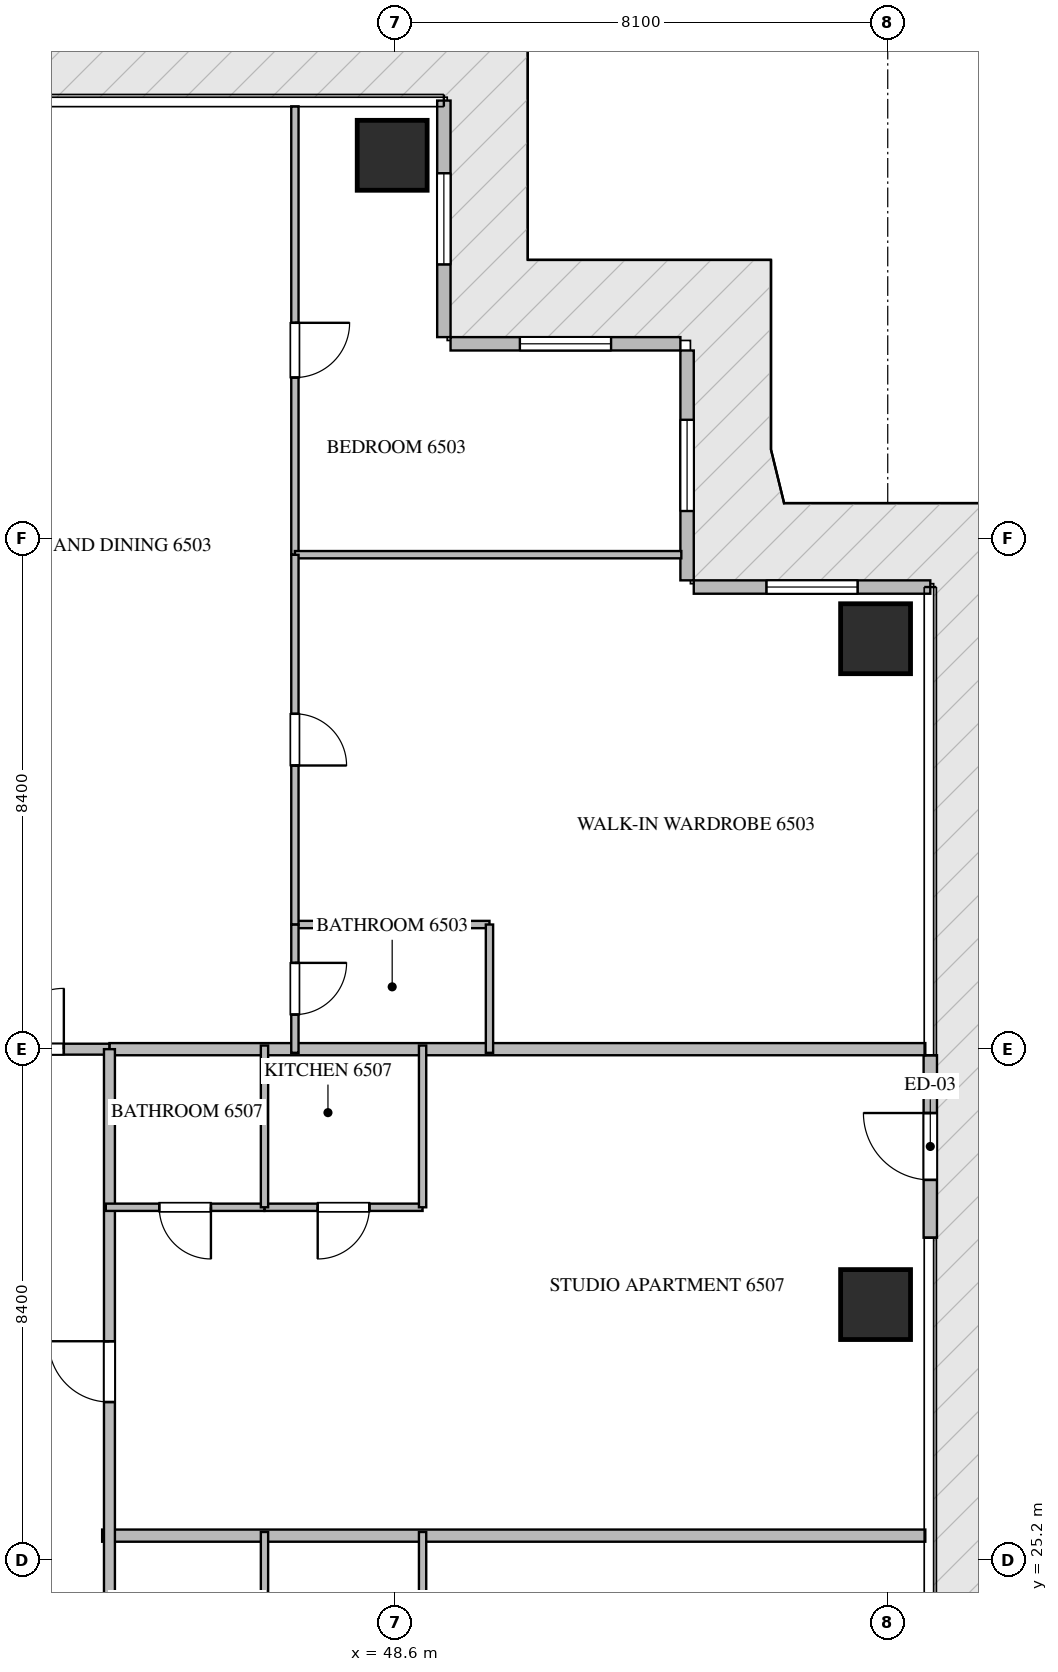
"""IFC4 building model, lengths in metres.
Left out: names, types, materials, properties, quantities, classifications, styles, units other than length and angle.
Written with IfcOpenShell. Run it as: python <this file> out.ifc"""

import sys

from ifc_helpers import new_model, si_unit, direction, frame, frame_2d, origin, origin_2d, place, context, subcontext, project, spatial, rectangle, extrude, source, transform, mapped, element, fill, save


model = new_model("IFC4")
c1 = context("Model", 3, precision=1e-05, world=origin(), true_north=direction((0.0, 1.0)))
c2 = subcontext(c1, "Body", "Model", "MODEL_VIEW")
j1 = project(units=[si_unit("LENGTHUNIT", "METRE"), si_unit("PLANEANGLEUNIT", "RADIAN")], contexts=[c1])
p1 = place(None, origin())
s1 = spatial("IfcSite", under=j1, at=p1, CompositionType="ELEMENT")
p2 = place(p1, origin())
s2 = spatial("IfcBuilding", under=s1, at=p2, CompositionType="ELEMENT")
p3 = place(p2, frame((0.0, 0.0, 260.5)))
s3 = spatial("IfcBuildingStorey", under=s2, at=p3, CompositionType="ELEMENT", Elevation=260.5)
m1 = source(origin(), c2, "Body", "SweptSolid", [
    extrude(rectangle(XDim=1.15, YDim=1.15, at=origin_2d()), origin(), (0.0, 0.0, 1.0), 3.85),
])
for number, where, z_axis, x_axis in (
    (1, (48.55, 48.3, -0.26), (0.0, 0.0, 1.0), (1.0, 0.0, 0.0)),
    (2, (56.5, 29.4, -0.26), (0.0, 0.0, 1.0), (1.0, 0.0, 0.0)),
    (3, (56.5, 40.35, -0.26), (0.0, 0.0, 1.0), (1.0, 0.0, 0.0)),
):
    element("IfcColumn", number, at=place(p3, frame(where, z_axis=z_axis, x_axis=x_axis)), inside=s3, PredefinedType="COLUMN", context=c2, shape_type="MappedRepresentation", body=[
        mapped(m1, transform((0.0, 0.0, 0.0), scale=1.0)),
    ])
p4 = place(p3, frame((57.4, 30.5, 0.0), z_axis=(0.0, 0.0, 1.0), x_axis=(0.0, 1.0, 0.0)))
e4 = element("IfcWall", 4, at=p4, inside=s3, PredefinedType="ELEMENTEDWALL", context=c2, shape_type="SweptSolid", body=[
    extrude(rectangle(XDim=3.0, YDim=0.22, at=frame_2d((1.5, 0.0))), origin(), (0.0, 0.0, 1.0), 3.575),
])
p5 = place(p4, frame((0.95, 0.0, 0.0)))
e5 = element("IfcOpeningElement", 5, at=p5, cuts=e4, PredefinedType="OPENING", context=c2, shape_type="SweptSolid", body=[
    extrude(rectangle(XDim=1.1, YDim=2.2, at=frame_2d((0.55, 1.1))), frame((0.0, 0.12, 0.0), z_axis=(0.0, -1.0, 0.0), x_axis=(1.0, 0.0, 0.0)), (0.0, 0.0, 1.0), 0.24),
])
p6 = place(p3, frame((57.4, 41.2, 0.0), z_axis=(0.0, 0.0, 1.0), x_axis=(-1.0, 0.0, 0.0)))
e6 = element("IfcWall", 6, at=p6, inside=s3, PredefinedType="ELEMENTEDWALL", context=c2, shape_type="SweptSolid", body=[
    extrude(rectangle(XDim=3.89, YDim=0.22, at=frame_2d((1.945, 0.0))), origin(), (0.0, 0.0, 1.0), 3.575),
])
p7 = place(p6, frame((1.195, 0.0, 0.65)))
e7 = element("IfcOpeningElement", 7, at=p7, cuts=e6, PredefinedType="OPENING", context=c2, shape_type="SweptSolid", body=[
    extrude(rectangle(XDim=1.5, YDim=2.25, at=frame_2d((0.75, 1.125))), frame((0.0, 0.12, 0.0), z_axis=(0.0, -1.0, 0.0), x_axis=(1.0, 0.0, 0.0)), (0.0, 0.0, 1.0), 0.24),
])
p8 = place(p3, frame((53.4, 41.31, 0.0), z_axis=(0.0, 0.0, 1.0), x_axis=(0.0, 1.0, 0.0)))
e8 = element("IfcWall", 8, at=p8, inside=s3, PredefinedType="ELEMENTEDWALL", context=c2, shape_type="SweptSolid", body=[
    extrude(rectangle(XDim=3.78, YDim=0.22, at=frame_2d((1.89, 0.0))), origin(), (0.0, 0.0, 1.0), 3.575),
])
p9 = place(p8, frame((1.14, 0.0, 0.65)))
e9 = element("IfcOpeningElement", 9, at=p9, cuts=e8, PredefinedType="OPENING", context=c2, shape_type="SweptSolid", body=[
    extrude(rectangle(XDim=1.5, YDim=2.25, at=frame_2d((0.75, 1.125))), frame((0.0, 0.12, 0.0), z_axis=(0.0, -1.0, 0.0), x_axis=(1.0, 0.0, 0.0)), (0.0, 0.0, 1.0), 0.24),
])
p10 = place(p3, frame((53.29, 45.2, 0.0), z_axis=(0.0, 0.0, 1.0), x_axis=(-1.0, 0.0, 0.0)))
e10 = element("IfcWall", 10, at=p10, inside=s3, PredefinedType="ELEMENTEDWALL", context=c2, shape_type="SweptSolid", body=[
    extrude(rectangle(XDim=3.78, YDim=0.22, at=frame_2d((1.89, 0.0))), origin(), (0.0, 0.0, 1.0), 3.575),
])
p11 = place(p10, frame((1.14, 0.0, 0.65)))
e11 = element("IfcOpeningElement", 11, at=p11, cuts=e10, PredefinedType="OPENING", context=c2, shape_type="SweptSolid", body=[
    extrude(rectangle(XDim=1.5, YDim=2.25, at=frame_2d((0.75, 1.125))), frame((0.0, 0.12, 0.0), z_axis=(0.0, -1.0, 0.0), x_axis=(1.0, 0.0, 0.0)), (0.0, 0.0, 1.0), 0.24),
])
p12 = place(p3, frame((49.4, 45.31, 0.0), z_axis=(0.0, 0.0, 1.0), x_axis=(0.0, 1.0, 0.0)))
e12 = element("IfcWall", 12, at=p12, inside=s3, PredefinedType="ELEMENTEDWALL", context=c2, shape_type="SweptSolid", body=[
    extrude(rectangle(XDim=3.89, YDim=0.22, at=frame_2d((1.945, 0.0))), origin(), (0.0, 0.0, 1.0), 3.575),
])
p13 = place(p12, frame((1.195, 0.0, 0.65)))
e13 = element("IfcOpeningElement", 13, at=p13, cuts=e12, PredefinedType="OPENING", context=c2, shape_type="SweptSolid", body=[
    extrude(rectangle(XDim=1.5, YDim=2.25, at=frame_2d((0.75, 1.125))), frame((0.0, 0.12, 0.0), z_axis=(0.0, -1.0, 0.0), x_axis=(1.0, 0.0, 0.0)), (0.0, 0.0, 1.0), 0.24),
])
p14 = place(p3, frame((43.78, 25.6, 0.0), z_axis=(0.0, 0.0, 1.0), x_axis=(1.0, 0.0, 0.0)))
e14 = element("IfcWall", 14, at=p14, inside=s3, PredefinedType="PARTITIONING", context=c2, shape_type="SweptSolid", body=[
    extrude(rectangle(XDim=13.538, YDim=0.2, at=frame_2d((6.769, 0.0))), origin(), (0.0, 0.0, 1.0), 3.59),
])
p15 = place(p3, frame((43.9, 33.6, 0.0), z_axis=(0.0, 0.0, 1.0), x_axis=(1.0, 0.0, 0.0)))
e15 = element("IfcWall", 15, at=p15, inside=s3, PredefinedType="PARTITIONING", context=c2, shape_type="SweptSolid", body=[
    extrude(rectangle(XDim=13.418, YDim=0.2, at=frame_2d((6.709, 0.0))), origin(), (0.0, 0.0, 1.0), 3.59),
])
p16 = place(p3, frame((41.402, 33.6, 0.0), z_axis=(0.0, 0.0, 1.0), x_axis=(1.0, 0.0, 0.0)))
e16 = element("IfcWall", 16, at=p16, inside=s3, PredefinedType="PARTITIONING", context=c2, shape_type="SweptSolid", body=[
    extrude(rectangle(XDim=2.496, YDim=0.18, at=frame_2d((1.248, 0.0))), origin(), (0.0, 0.0, 1.0), 3.59),
])
p17 = place(p16, frame((0.748, 0.0, 0.0)))
e17 = element("IfcOpeningElement", 17, at=p17, cuts=e16, PredefinedType="OPENING", context=c2, shape_type="SweptSolid", body=[
    extrude(rectangle(XDim=1.0, YDim=2.15, at=frame_2d((0.5, 1.075))), frame((0.0, 0.1, 0.0), z_axis=(0.0, -1.0, 0.0), x_axis=(1.0, 0.0, 0.0)), (0.0, 0.0, 1.0), 0.2),
])
p18 = place(p3, frame((43.9, 16.8, 0.0), z_axis=(0.0, 0.0, 1.0), x_axis=(0.0, 1.0, 0.0)))
e18 = element("IfcWall", 18, at=p18, inside=s3, PredefinedType="PARTITIONING", context=c2, shape_type="SweptSolid", body=[
    extrude(rectangle(XDim=16.8, YDim=0.18, at=frame_2d((8.4, 0.0))), origin(), (0.0, 0.0, 1.0), 3.59),
])
p19 = place(p18, frame((2.575, 0.0, 0.0)))
e19 = element("IfcOpeningElement", 19, at=p19, cuts=e18, PredefinedType="OPENING", context=c2, shape_type="SweptSolid", body=[
    extrude(rectangle(XDim=1.0, YDim=2.15, at=frame_2d((0.5, 1.075))), frame((0.0, 0.1, 0.0), z_axis=(0.0, -1.0, 0.0), x_axis=(1.0, 0.0, 0.0)), (0.0, 0.0, 1.0), 0.2),
])
p20 = place(p18, frame((10.997, 0.0, 0.0)))
e20 = element("IfcOpeningElement", 20, at=p20, cuts=e18, PredefinedType="OPENING", context=c2, shape_type="SweptSolid", body=[
    extrude(rectangle(XDim=1.0, YDim=2.15, at=frame_2d((0.5, 1.075))), frame((0.0, 0.1, 0.0), z_axis=(0.0, -1.0, 0.0), x_axis=(1.0, 0.0, 0.0)), (0.0, 0.0, 1.0), 0.2),
])
p21 = place(p3, frame((46.95, 49.105, 0.0), z_axis=(0.0, 0.0, 1.0), x_axis=(0.0, -1.0, 0.0)))
e21 = element("IfcWall", 21, at=p21, inside=s3, PredefinedType="PARTITIONING", context=c2, shape_type="SweptSolid", body=[
    extrude(rectangle(XDim=7.373, YDim=0.12, at=frame_2d((3.687, 0.0))), origin(), (0.0, 0.0, 1.0), 3.59),
])
p22 = place(p21, frame((3.56, 0.0, 0.0)))
e22 = element("IfcOpeningElement", 22, at=p22, cuts=e21, PredefinedType="OPENING", context=c2, shape_type="SweptSolid", body=[
    extrude(rectangle(XDim=0.9, YDim=2.1, at=frame_2d((0.45, 1.05))), frame((0.0, 0.07, 0.0), z_axis=(0.0, -1.0, 0.0), x_axis=(1.0, 0.0, 0.0)), (0.0, 0.0, 1.0), 0.14),
])
p23 = place(p3, frame((46.95, 41.732, 0.0), z_axis=(0.0, 0.0, 1.0), x_axis=(1.0, 0.0, 0.0)))
e23 = element("IfcWall", 23, at=p23, inside=s3, PredefinedType="PARTITIONING", context=c2, shape_type="SweptSolid", body=[
    extrude(rectangle(XDim=6.355, YDim=0.12, at=frame_2d((3.177, 0.0))), origin(), (0.0, 0.0, 1.0), 3.59),
])
p24 = place(p3, frame((46.95, 35.65, 0.0), z_axis=(0.0, 0.0, 1.0), x_axis=(1.0, 0.0, 0.0)))
e24 = element("IfcWall", 24, at=p24, inside=s3, PredefinedType="PARTITIONING", context=c2, shape_type="SweptSolid", body=[
    extrude(rectangle(XDim=3.2, YDim=0.12, at=frame_2d((1.6, 0.0))), origin(), (0.0, 0.0, 1.0), 3.59),
])
p25 = place(p3, frame((50.15, 35.65, 0.0), z_axis=(0.0, 0.0, 1.0), x_axis=(0.0, -1.0, 0.0)))
e25 = element("IfcWall", 25, at=p25, inside=s3, PredefinedType="PARTITIONING", context=c2, shape_type="SweptSolid", body=[
    extrude(rectangle(XDim=2.11, YDim=0.12, at=frame_2d((1.055, 0.0))), origin(), (0.0, 0.0, 1.0), 3.59),
])
p26 = place(p3, frame((46.95, 41.73, 0.0), z_axis=(0.0, 0.0, 1.0), x_axis=(0.0, -1.0, 0.0)))
e26 = element("IfcWall", 26, at=p26, inside=s3, PredefinedType="PARTITIONING", context=c2, shape_type="SweptSolid", body=[
    extrude(rectangle(XDim=6.08, YDim=0.12, at=frame_2d((3.04, 0.0))), origin(), (0.0, 0.0, 1.0), 3.59),
])
p27 = place(p26, frame((2.615, 0.0, 0.0)))
e27 = element("IfcOpeningElement", 27, at=p27, cuts=e26, PredefinedType="OPENING", context=c2, shape_type="SweptSolid", body=[
    extrude(rectangle(XDim=0.85, YDim=2.1, at=frame_2d((0.425, 1.05))), frame((0.0, 0.07, 0.0), z_axis=(0.0, -1.0, 0.0), x_axis=(1.0, 0.0, 0.0)), (0.0, 0.0, 1.0), 0.14),
])
p28 = place(p3, frame((46.95, 35.648, 0.0), z_axis=(0.0, 0.0, 1.0), x_axis=(0.0, -1.0, 0.0)))
e28 = element("IfcWall", 28, at=p28, inside=s3, PredefinedType="PARTITIONING", context=c2, shape_type="SweptSolid", body=[
    extrude(rectangle(XDim=2.108, YDim=0.12, at=frame_2d((1.054, 0.0))), origin(), (0.0, 0.0, 1.0), 3.59),
])
p29 = place(p28, frame((0.629, 0.0, 0.0)))
e29 = element("IfcOpeningElement", 29, at=p29, cuts=e28, PredefinedType="OPENING", context=c2, shape_type="SweptSolid", body=[
    extrude(rectangle(XDim=0.85, YDim=2.1, at=frame_2d((0.425, 1.05))), frame((0.0, 0.07, 0.0), z_axis=(0.0, -1.0, 0.0), x_axis=(1.0, 0.0, 0.0)), (0.0, 0.0, 1.0), 0.14),
])
for number, where, z_axis, x_axis in (
    (30, (46.45, 22.85, 0.0), (0.0, 0.0, 1.0), (0.0, 1.0, 0.0)),
    (31, (49.05, 22.85, 0.0), (0.0, 0.0, 1.0), (0.0, 1.0, 0.0)),
):
    element("IfcWall", number, at=place(p3, frame(where, z_axis=z_axis, x_axis=x_axis)), inside=s3, PredefinedType="PARTITIONING", context=c2, shape_type="SweptSolid", body=[
        extrude(rectangle(XDim=2.81, YDim=0.12, at=frame_2d((1.405, 0.0))), origin(), (0.0, 0.0, 1.0), 3.59),
    ])
p30 = place(p3, frame((49.05, 31.0, 0.0), z_axis=(0.0, 0.0, 1.0), x_axis=(-1.0, 0.0, 0.0)))
e32 = element("IfcWall", 32, at=p30, inside=s3, PredefinedType="PARTITIONING", context=c2, shape_type="SweptSolid", body=[
    extrude(rectangle(XDim=2.6, YDim=0.12, at=frame_2d((1.3, 0.0))), origin(), (0.0, 0.0, 1.0), 3.59),
])
p31 = place(p30, frame((0.875, 0.0, 0.0)))
e33 = element("IfcOpeningElement", 33, at=p31, cuts=e32, PredefinedType="OPENING", context=c2, shape_type="SweptSolid", body=[
    extrude(rectangle(XDim=0.85, YDim=2.1, at=frame_2d((0.425, 1.05))), frame((0.0, 0.07, 0.0), z_axis=(0.0, -1.0, 0.0), x_axis=(1.0, 0.0, 0.0)), (0.0, 0.0, 1.0), 0.14),
])
p32 = place(p3, frame((46.448, 31.0, 0.0), z_axis=(0.0, 0.0, 1.0), x_axis=(-1.0, 0.0, 0.0)))
e34 = element("IfcWall", 34, at=p32, inside=s3, PredefinedType="PARTITIONING", context=c2, shape_type="SweptSolid", body=[
    extrude(rectangle(XDim=2.608, YDim=0.12, at=frame_2d((1.304, 0.0))), origin(), (0.0, 0.0, 1.0), 3.59),
])
p33 = place(p32, frame((0.879, 0.0, 0.0)))
e35 = element("IfcOpeningElement", 35, at=p33, cuts=e34, PredefinedType="OPENING", context=c2, shape_type="SweptSolid", body=[
    extrude(rectangle(XDim=0.85, YDim=2.1, at=frame_2d((0.425, 1.05))), frame((0.0, 0.07, 0.0), z_axis=(0.0, -1.0, 0.0), x_axis=(1.0, 0.0, 0.0)), (0.0, 0.0, 1.0), 0.14),
])
for number, where, z_axis, x_axis in (
    (36, (46.45, 31.0, 0.0), (0.0, 0.0, 1.0), (0.0, 1.0, 0.0)),
    (37, (49.05, 31.0, 0.0), (0.0, 0.0, 1.0), (0.0, 1.0, 0.0)),
):
    element("IfcWall", number, at=place(p3, frame(where, z_axis=z_axis, x_axis=x_axis)), inside=s3, PredefinedType="PARTITIONING", context=c2, shape_type="SweptSolid", body=[
        extrude(rectangle(XDim=2.66, YDim=0.12, at=frame_2d((1.33, 0.0))), origin(), (0.0, 0.0, 1.0), 3.59),
    ])
m2 = source(origin(), c2, "Body", "SweptSolid", [
    extrude(rectangle(XDim=1.1, YDim=2.2, at=frame_2d((0.55, 1.1))), frame((0.0, 0.025, 0.0), z_axis=(0.0, -1.0, 0.0), x_axis=(1.0, 0.0, 0.0)), (0.0, 0.0, 1.0), 0.05),
])
p34 = place(p5, origin())
e38 = element("IfcDoor", 38, at=p34, inside=s3, OperationType="SINGLE_SWING_RIGHT", PredefinedType="DOOR", context=c2, shape_type="MappedRepresentation", body=[
    mapped(m2, transform((0.0, 0.0, 0.0), scale=1.0)),
])
fill(e5, e38)
m3 = source(origin(), c2, "Body", "SweptSolid", [
    extrude(rectangle(XDim=1.5, YDim=2.25, at=frame_2d((0.75, 1.125))), frame((0.0, 0.03, 0.0), z_axis=(0.0, -1.0, 0.0), x_axis=(1.0, 0.0, 0.0)), (0.0, 0.0, 1.0), 0.06),
])
p35 = place(p7, origin())
e39 = element("IfcWindow", 39, at=p35, inside=s3, PartitioningType="SINGLE_PANEL", PredefinedType="WINDOW", context=c2, shape_type="MappedRepresentation", body=[
    mapped(m3, transform((0.0, 0.0, 0.0), scale=1.0)),
])
fill(e7, e39)
p36 = place(p9, origin())
e40 = element("IfcWindow", 40, at=p36, inside=s3, PartitioningType="SINGLE_PANEL", PredefinedType="WINDOW", context=c2, shape_type="MappedRepresentation", body=[
    mapped(m3, transform((0.0, 0.0, 0.0), scale=1.0)),
])
fill(e9, e40)
p37 = place(p11, origin())
e41 = element("IfcWindow", 41, at=p37, inside=s3, PartitioningType="SINGLE_PANEL", PredefinedType="WINDOW", context=c2, shape_type="MappedRepresentation", body=[
    mapped(m3, transform((0.0, 0.0, 0.0), scale=1.0)),
])
fill(e11, e41)
p38 = place(p13, origin())
e42 = element("IfcWindow", 42, at=p38, inside=s3, PartitioningType="SINGLE_PANEL", PredefinedType="WINDOW", context=c2, shape_type="MappedRepresentation", body=[
    mapped(m3, transform((0.0, 0.0, 0.0), scale=1.0)),
])
fill(e13, e42)
m4 = source(origin(), c2, "Body", "SweptSolid", [
    extrude(rectangle(XDim=1.0, YDim=2.15, at=frame_2d((0.5, 1.075))), frame((0.0, 0.025, 0.0), z_axis=(0.0, -1.0, 0.0), x_axis=(1.0, 0.0, 0.0)), (0.0, 0.0, 1.0), 0.05),
])
p39 = place(p17, origin())
e43 = element("IfcDoor", 43, at=p39, inside=s3, OperationType="SINGLE_SWING_RIGHT", PredefinedType="DOOR", context=c2, shape_type="MappedRepresentation", body=[
    mapped(m4, transform((0.0, 0.0, 0.0), scale=1.0)),
])
fill(e17, e43)
p40 = place(p20, origin())
e44 = element("IfcDoor", 44, at=p40, inside=s3, OperationType="SINGLE_SWING_RIGHT", PredefinedType="DOOR", context=c2, shape_type="MappedRepresentation", body=[
    mapped(m4, transform((0.0, 0.0, 0.0), scale=1.0)),
])
fill(e20, e44)
m5 = source(origin(), c2, "Body", "SweptSolid", [
    extrude(rectangle(XDim=0.9, YDim=2.1, at=frame_2d((0.45, 1.05))), frame((0.0, 0.025, 0.0), z_axis=(0.0, -1.0, 0.0), x_axis=(1.0, 0.0, 0.0)), (0.0, 0.0, 1.0), 0.05),
])
p41 = place(p22, origin())
e45 = element("IfcDoor", 45, at=p41, inside=s3, OperationType="SINGLE_SWING_LEFT", PredefinedType="DOOR", context=c2, shape_type="MappedRepresentation", body=[
    mapped(m5, transform((0.0, 0.0, 0.0), scale=1.0)),
])
fill(e22, e45)
m6 = source(origin(), c2, "Body", "SweptSolid", [
    extrude(rectangle(XDim=0.85, YDim=2.1, at=frame_2d((0.425, 1.05))), frame((0.0, 0.025, 0.0), z_axis=(0.0, -1.0, 0.0), x_axis=(1.0, 0.0, 0.0)), (0.0, 0.0, 1.0), 0.05),
])
p42 = place(p27, origin())
e46 = element("IfcDoor", 46, at=p42, inside=s3, OperationType="SINGLE_SWING_RIGHT", PredefinedType="DOOR", context=c2, shape_type="MappedRepresentation", body=[
    mapped(m6, transform((0.0, 0.0, 0.0), scale=1.0)),
])
fill(e27, e46)
p43 = place(p29, origin())
e47 = element("IfcDoor", 47, at=p43, inside=s3, OperationType="SINGLE_SWING_LEFT", PredefinedType="DOOR", context=c2, shape_type="MappedRepresentation", body=[
    mapped(m6, transform((0.0, 0.0, 0.0), scale=1.0)),
])
fill(e29, e47)
p44 = place(p31, origin())
e48 = element("IfcDoor", 48, at=p44, inside=s3, OperationType="SINGLE_SWING_RIGHT", PredefinedType="DOOR", context=c2, shape_type="MappedRepresentation", body=[
    mapped(m6, transform((0.0, 0.0, 0.0), scale=1.0)),
])
fill(e33, e48)
p45 = place(p33, origin())
e49 = element("IfcDoor", 49, at=p45, inside=s3, OperationType="SINGLE_SWING_LEFT", PredefinedType="DOOR", context=c2, shape_type="MappedRepresentation", body=[
    mapped(m6, transform((0.0, 0.0, 0.0), scale=1.0)),
])
fill(e35, e49)
save(model, sys.argv[1])
